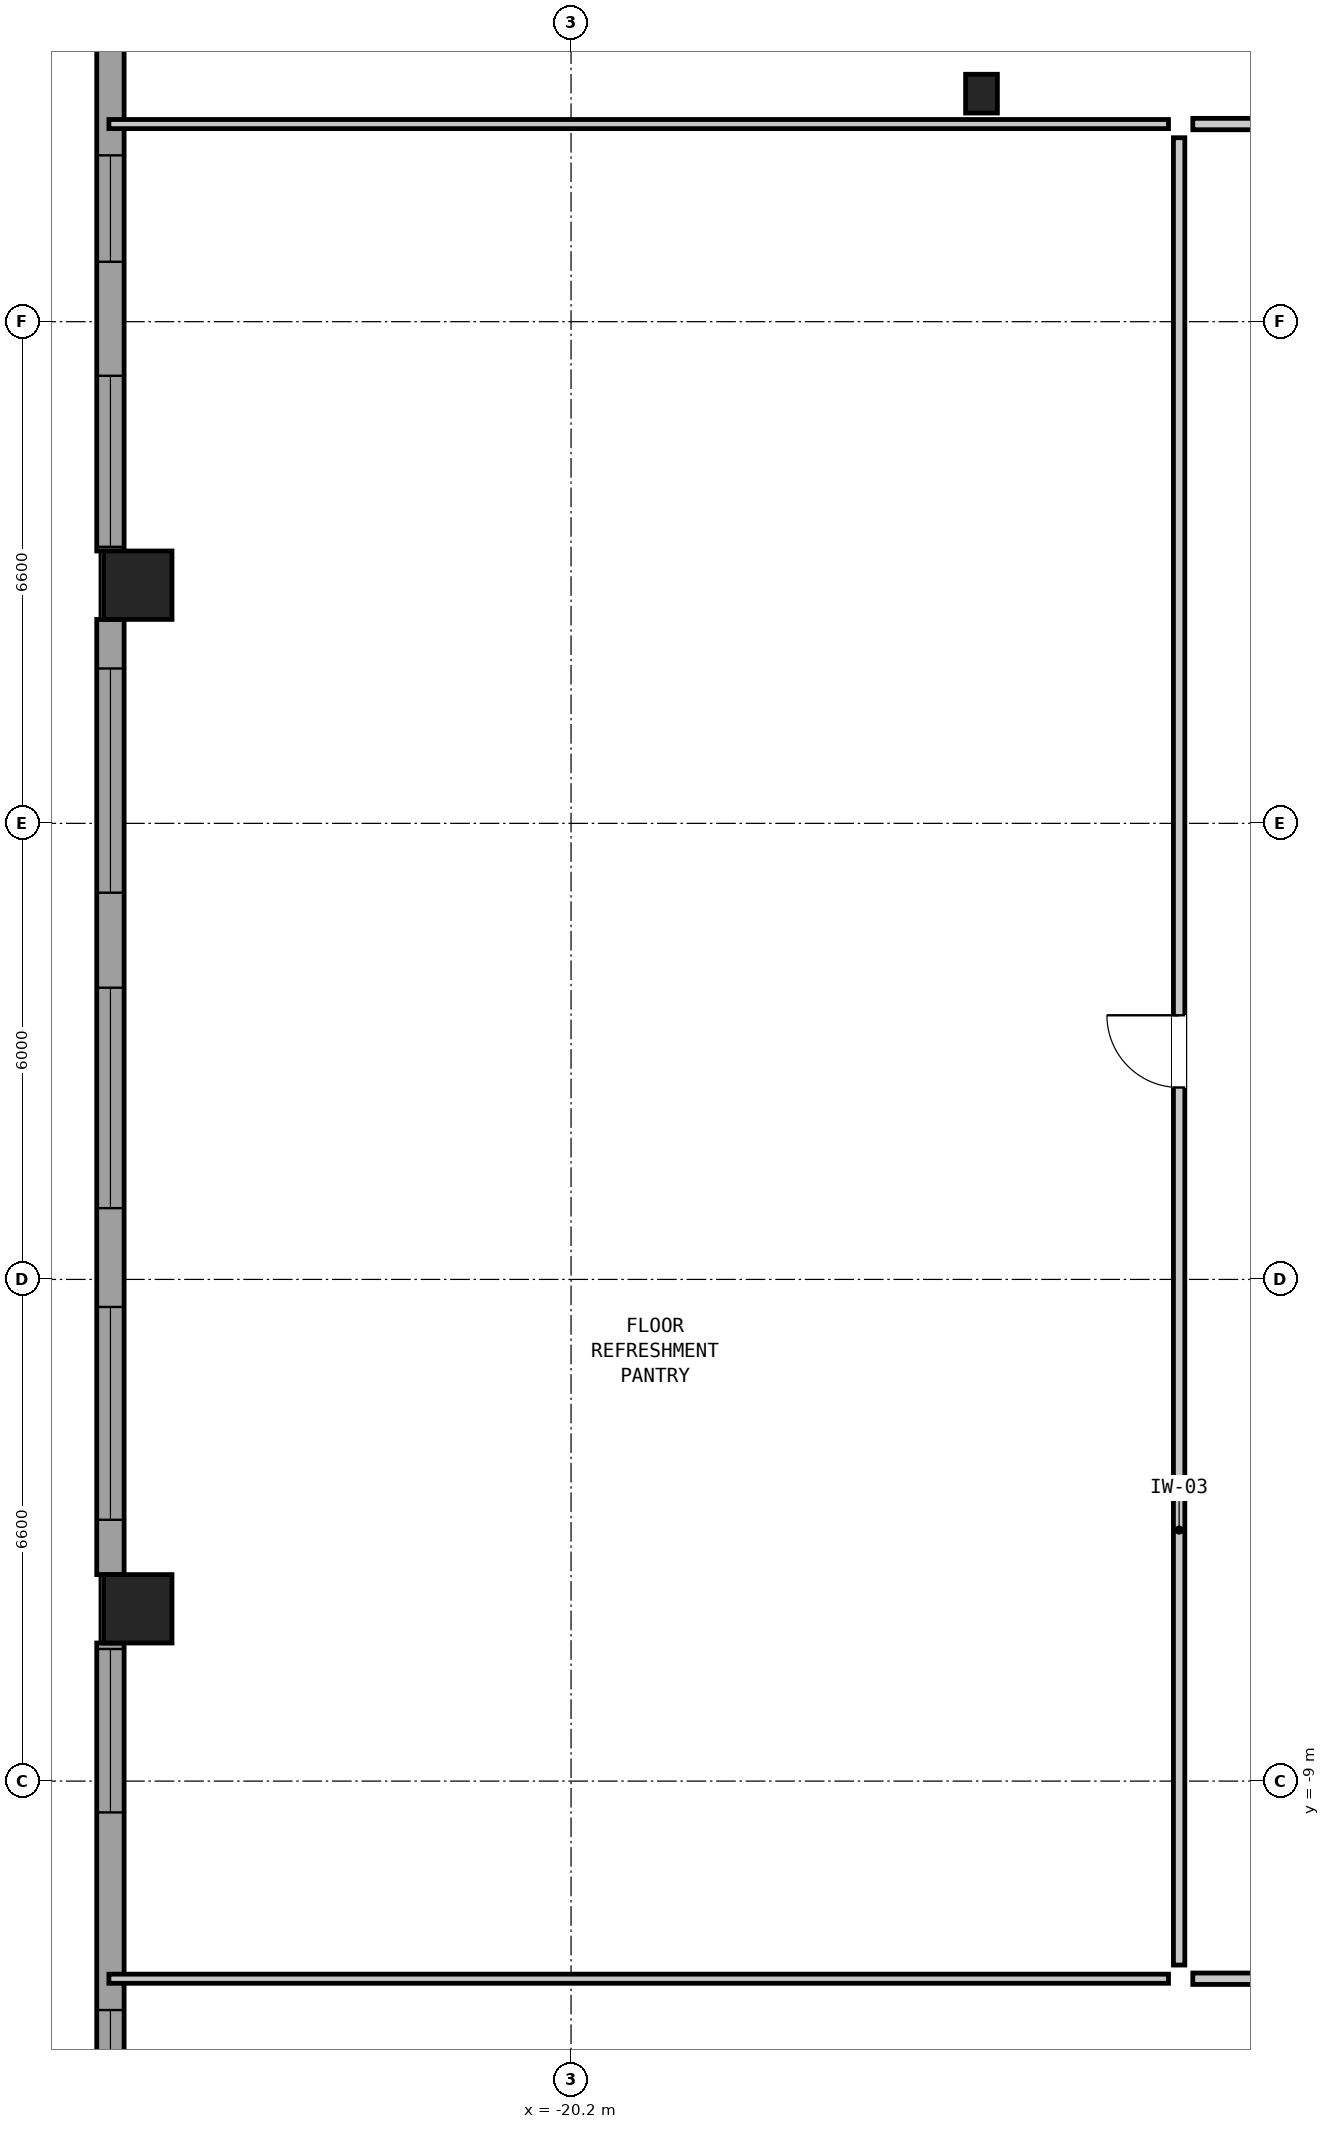
"""IFC4 building model, lengths in metres.
Left out: names, types, materials, properties, quantities, classifications, styles, units other than length and angle.
Written with IfcOpenShell. Run it as: python <this file> out.ifc"""

import sys

from ifc_helpers import new_model, si_unit, direction, frame, frame_2d, origin, origin_2d, place, context, subcontext, project, spatial, rectangle, hollow_rectangle, i_section, extrude, element, fill, save


model = new_model("IFC4")
c1 = context("Model", 3, precision=1e-05, world=origin(), true_north=direction((0.0, 1.0)))
c2 = subcontext(c1, "Body", "Model", "MODEL_VIEW")
j1 = project(units=[si_unit("LENGTHUNIT", "METRE"), si_unit("PLANEANGLEUNIT", "RADIAN")], contexts=[c1])
p1 = place(None, origin())
s1 = spatial("IfcSite", under=j1, at=p1, CompositionType="ELEMENT")
p2 = place(p1, origin())
s2 = spatial("IfcBuilding", under=s1, at=p2, CompositionType="ELEMENT")
p3 = place(p2, frame((0.0, 0.0, 29.15)))
s3 = spatial("IfcBuildingStorey", under=s2, at=p3, CompositionType="ELEMENT", Elevation=29.15)
for number, where, z_axis, x_axis in (
    (1, (-25.9, 6.733, 0.0), (0.0, 0.0, 1.0), (0.0, 1.0, 0.0)),
    (2, (-25.9, -6.733, 0.0), (0.0, 0.0, 1.0), (0.0, 1.0, 0.0)),
):
    element("IfcColumn", number, at=place(p3, frame(where, z_axis=z_axis, x_axis=x_axis)), inside=s3, PredefinedType="COLUMN", context=c2, shape_type="SweptSolid", body=[
        extrude(hollow_rectangle(XDim=0.9, YDim=0.9, WallThickness=0.055, at=origin_2d()), origin(), (0.0, 0.0, 1.0), 3.05),
    ])
p4 = place(p3, frame((-14.8, 13.2, 0.0), z_axis=(0.0, 0.0, 1.0), x_axis=(1.0, 0.0, 0.0)))
e3 = element("IfcColumn", 3, at=p4, inside=s3, PredefinedType="COLUMN", context=c2, shape_type="SweptSolid", body=[
    extrude(i_section(OverallWidth=0.418, OverallDepth=0.51, WebThickness=0.042, FlangeThickness=0.068, at=origin_2d()), origin(), (0.0, 0.0, 1.0), 3.05),
])
p5 = place(p3, frame((-26.26, -19.762, 0.0), z_axis=(0.0, 0.0, 1.0), x_axis=(0.0, 1.0, 0.0)))
e4 = element("IfcWall", 4, at=p5, inside=s3, PredefinedType="SOLIDWALL", context=c2, shape_type="SweptSolid", body=[
    extrude(rectangle(XDim=12.579, YDim=0.36, at=frame_2d((6.289, 0.0))), origin(), (0.0, 0.0, 1.0), 2.067),
])
p6 = place(p5, frame((1.8, 0.0, 0.2)))
e5 = element("IfcOpeningElement", 5, at=p6, cuts=e4, PredefinedType="OPENING", context=c2, shape_type="SweptSolid", body=[
    extrude(rectangle(XDim=2.65, YDim=1.05, at=frame_2d((1.325, 0.525))), frame((0.0, 0.192, 0.0), z_axis=(0.0, -1.0, 0.0), x_axis=(1.0, 0.0, 0.0)), (0.0, 0.0, 1.0), 0.384),
])
p7 = place(p5, frame((6.1, 0.0, 0.75)))
e6 = element("IfcOpeningElement", 6, at=p7, cuts=e4, PredefinedType="OPENING", context=c2, shape_type="SweptSolid", body=[
    extrude(rectangle(XDim=1.65, YDim=1.15, at=frame_2d((0.825, 0.575))), frame((0.0, 0.192, 0.0), z_axis=(0.0, -1.0, 0.0), x_axis=(1.0, 0.0, 0.0)), (0.0, 0.0, 1.0), 0.384),
])
p8 = place(p5, frame((10.35, 0.0, 0.2)))
e7 = element("IfcOpeningElement", 7, at=p8, cuts=e4, PredefinedType="OPENING", context=c2, shape_type="SweptSolid", body=[
    extrude(rectangle(XDim=2.15, YDim=1.2, at=frame_2d((1.075, 0.6))), frame((0.0, 0.192, 0.0), z_axis=(0.0, -1.0, 0.0), x_axis=(1.0, 0.0, 0.0)), (0.0, 0.0, 1.0), 0.384),
])
p9 = place(p3, frame((-26.26, -6.283, 0.0), z_axis=(0.0, 0.0, 1.0), x_axis=(0.0, 1.0, 0.0)))
e8 = element("IfcWall", 8, at=p9, inside=s3, PredefinedType="SOLIDWALL", context=c2, shape_type="SweptSolid", body=[
    extrude(rectangle(XDim=12.566, YDim=0.36, at=frame_2d((6.283, 0.0))), origin(), (0.0, 0.0, 1.0), 2.067),
])
p10 = place(p9, frame((0.721, 0.0, 0.9)))
e9 = element("IfcOpeningElement", 9, at=p10, cuts=e8, PredefinedType="OPENING", context=c2, shape_type="SweptSolid", body=[
    extrude(rectangle(XDim=2.8, YDim=1.0, at=frame_2d((1.4, 0.5))), frame((0.0, 0.192, 0.0), z_axis=(0.0, -1.0, 0.0), x_axis=(1.0, 0.0, 0.0)), (0.0, 0.0, 1.0), 0.384),
])
p11 = place(p9, frame((4.821, 0.0, 0.2)))
e10 = element("IfcOpeningElement", 10, at=p11, cuts=e8, PredefinedType="OPENING", context=c2, shape_type="SweptSolid", body=[
    extrude(rectangle(XDim=2.9, YDim=0.95, at=frame_2d((1.45, 0.475))), frame((0.0, 0.192, 0.0), z_axis=(0.0, -1.0, 0.0), x_axis=(1.0, 0.0, 0.0)), (0.0, 0.0, 1.0), 0.384),
])
p12 = place(p9, frame((8.971, 0.0, 0.95)))
e11 = element("IfcOpeningElement", 11, at=p12, cuts=e8, PredefinedType="OPENING", context=c2, shape_type="SweptSolid", body=[
    extrude(rectangle(XDim=2.95, YDim=0.95, at=frame_2d((1.475, 0.475))), frame((0.0, 0.192, 0.0), z_axis=(0.0, -1.0, 0.0), x_axis=(1.0, 0.0, 0.0)), (0.0, 0.0, 1.0), 0.384),
])
p13 = place(p3, frame((-26.26, 7.183, 0.0), z_axis=(0.0, 0.0, 1.0), x_axis=(0.0, 1.0, 0.0)))
e12 = element("IfcWall", 12, at=p13, inside=s3, PredefinedType="SOLIDWALL", context=c2, shape_type="SweptSolid", body=[
    extrude(rectangle(XDim=12.579, YDim=0.36, at=frame_2d((6.289, 0.0))), origin(), (0.0, 0.0, 1.0), 2.067),
])
p14 = place(p13, frame((0.055, 0.0, 0.2)))
e13 = element("IfcOpeningElement", 13, at=p14, cuts=e12, PredefinedType="OPENING", context=c2, shape_type="SweptSolid", body=[
    extrude(rectangle(XDim=2.25, YDim=1.15, at=frame_2d((1.125, 0.575))), frame((0.0, 0.192, 0.0), z_axis=(0.0, -1.0, 0.0), x_axis=(1.0, 0.0, 0.0)), (0.0, 0.0, 1.0), 0.384),
])
p15 = place(p13, frame((3.805, 0.0, 0.95)))
e14 = element("IfcOpeningElement", 14, at=p15, cuts=e12, PredefinedType="OPENING", context=c2, shape_type="SweptSolid", body=[
    extrude(rectangle(XDim=1.4, YDim=0.95, at=frame_2d((0.7, 0.475))), frame((0.0, 0.192, 0.0), z_axis=(0.0, -1.0, 0.0), x_axis=(1.0, 0.0, 0.0)), (0.0, 0.0, 1.0), 0.384),
])
p16 = place(p13, frame((8.055, 0.0, 0.2)))
e15 = element("IfcOpeningElement", 15, at=p16, cuts=e12, PredefinedType="OPENING", context=c2, shape_type="SweptSolid", body=[
    extrude(rectangle(XDim=2.8, YDim=1.0, at=frame_2d((1.4, 0.5))), frame((0.0, 0.192, 0.0), z_axis=(0.0, -1.0, 0.0), x_axis=(1.0, 0.0, 0.0)), (0.0, 0.0, 1.0), 0.384),
])
p17 = place(p3, frame((-26.28, 12.8, 0.0), z_axis=(0.0, 0.0, 1.0), x_axis=(1.0, 0.0, 0.0)))
e16 = element("IfcWall", 16, at=p17, inside=s3, PredefinedType="PARTITIONING", context=c2, shape_type="SweptSolid", body=[
    extrude(rectangle(XDim=13.94, YDim=0.12, at=frame_2d((6.97, 0.0))), origin(), (0.0, 0.0, 1.0), 2.83),
])
p18 = place(p3, frame((-26.28, -11.6, 0.0), z_axis=(0.0, 0.0, 1.0), x_axis=(1.0, 0.0, 0.0)))
e17 = element("IfcWall", 17, at=p18, inside=s3, PredefinedType="PARTITIONING", context=c2, shape_type="SweptSolid", body=[
    extrude(rectangle(XDim=13.94, YDim=0.12, at=frame_2d((6.97, 0.0))), origin(), (0.0, 0.0, 1.0), 2.274),
])
p19 = place(p3, frame((-12.02, 12.8, 0.0), z_axis=(0.0, 0.0, 1.0), x_axis=(1.0, 0.0, 0.0)))
e18 = element("IfcWall", 18, at=p19, inside=s3, PredefinedType="PARTITIONING", context=c2, shape_type="SweptSolid", body=[
    extrude(rectangle(XDim=8.34, YDim=0.15, at=frame_2d((4.17, 0.0))), origin(), (0.0, 0.0, 1.0), 2.83),
])
p20 = place(p19, frame((3.695, 0.0, 0.0)))
e19 = element("IfcOpeningElement", 19, at=p20, cuts=e18, PredefinedType="OPENING", context=c2, shape_type="SweptSolid", body=[
    extrude(rectangle(XDim=0.95, YDim=2.1, at=frame_2d((0.475, 1.05))), frame((0.0, 0.087, 0.0), z_axis=(0.0, -1.0, 0.0), x_axis=(1.0, 0.0, 0.0)), (0.0, 0.0, 1.0), 0.174),
])
p21 = place(p3, frame((-12.02, -11.6, 0.0), z_axis=(0.0, 0.0, 1.0), x_axis=(1.0, 0.0, 0.0)))
e20 = element("IfcWall", 20, at=p21, inside=s3, PredefinedType="PARTITIONING", context=c2, shape_type="SweptSolid", body=[
    extrude(rectangle(XDim=24.04, YDim=0.15, at=frame_2d((12.02, 0.0))), origin(), (0.0, 0.0, 1.0), 2.274),
])
p22 = place(p21, frame((11.545, 0.0, 0.0)))
e21 = element("IfcOpeningElement", 21, at=p22, cuts=e20, PredefinedType="OPENING", context=c2, shape_type="SweptSolid", body=[
    extrude(rectangle(XDim=0.95, YDim=2.1, at=frame_2d((0.475, 1.05))), frame((0.0, 0.087, 0.0), z_axis=(0.0, -1.0, 0.0), x_axis=(1.0, 0.0, 0.0)), (0.0, 0.0, 1.0), 0.174),
])
p23 = place(p3, frame((-12.2, -11.42, 0.0), z_axis=(0.0, 0.0, 1.0), x_axis=(0.0, 1.0, 0.0)))
e22 = element("IfcWall", 22, at=p23, inside=s3, PredefinedType="PARTITIONING", context=c2, shape_type="SweptSolid", body=[
    extrude(rectangle(XDim=24.04, YDim=0.15, at=frame_2d((12.02, 0.0))), origin(), (0.0, 0.0, 1.0), 2.83),
])
p24 = place(p23, frame((11.545, 0.0, 0.0)))
e23 = element("IfcOpeningElement", 23, at=p24, cuts=e22, PredefinedType="OPENING", context=c2, shape_type="SweptSolid", body=[
    extrude(rectangle(XDim=0.95, YDim=2.1, at=frame_2d((0.475, 1.05))), frame((0.0, 0.087, 0.0), z_axis=(0.0, -1.0, 0.0), x_axis=(1.0, 0.0, 0.0)), (0.0, 0.0, 1.0), 0.174),
])
p25 = place(p7, origin())
e24 = element("IfcWindow", 24, at=p25, inside=s3, PartitioningType="SINGLE_PANEL", PredefinedType="WINDOW", context=c2, shape_type="SweptSolid", body=[
    extrude(rectangle(XDim=1.65, YDim=1.15, at=frame_2d((0.825, 0.575))), frame((0.0, 0.03, 0.0), z_axis=(0.0, -1.0, 0.0), x_axis=(1.0, 0.0, 0.0)), (0.0, 0.0, 1.0), 0.06),
])
fill(e6, e24)
p26 = place(p8, origin())
e25 = element("IfcWindow", 25, at=p26, inside=s3, PartitioningType="SINGLE_PANEL", PredefinedType="WINDOW", context=c2, shape_type="SweptSolid", body=[
    extrude(rectangle(XDim=2.15, YDim=1.2, at=frame_2d((1.075, 0.6))), frame((0.0, 0.03, 0.0), z_axis=(0.0, -1.0, 0.0), x_axis=(1.0, 0.0, 0.0)), (0.0, 0.0, 1.0), 0.06),
])
fill(e7, e25)
p27 = place(p10, origin())
e26 = element("IfcWindow", 26, at=p27, inside=s3, PartitioningType="SINGLE_PANEL", PredefinedType="WINDOW", context=c2, shape_type="SweptSolid", body=[
    extrude(rectangle(XDim=2.8, YDim=1.0, at=frame_2d((1.4, 0.5))), frame((0.0, 0.03, 0.0), z_axis=(0.0, -1.0, 0.0), x_axis=(1.0, 0.0, 0.0)), (0.0, 0.0, 1.0), 0.06),
])
fill(e9, e26)
p28 = place(p11, origin())
e27 = element("IfcWindow", 27, at=p28, inside=s3, PartitioningType="SINGLE_PANEL", PredefinedType="WINDOW", context=c2, shape_type="SweptSolid", body=[
    extrude(rectangle(XDim=2.9, YDim=0.95, at=frame_2d((1.45, 0.475))), frame((0.0, 0.03, 0.0), z_axis=(0.0, -1.0, 0.0), x_axis=(1.0, 0.0, 0.0)), (0.0, 0.0, 1.0), 0.06),
])
fill(e10, e27)
p29 = place(p12, origin())
e28 = element("IfcWindow", 28, at=p29, inside=s3, PartitioningType="SINGLE_PANEL", PredefinedType="WINDOW", context=c2, shape_type="SweptSolid", body=[
    extrude(rectangle(XDim=2.95, YDim=0.95, at=frame_2d((1.475, 0.475))), frame((0.0, 0.03, 0.0), z_axis=(0.0, -1.0, 0.0), x_axis=(1.0, 0.0, 0.0)), (0.0, 0.0, 1.0), 0.06),
])
fill(e11, e28)
p30 = place(p14, origin())
e29 = element("IfcWindow", 29, at=p30, inside=s3, PartitioningType="SINGLE_PANEL", PredefinedType="WINDOW", context=c2, shape_type="SweptSolid", body=[
    extrude(rectangle(XDim=2.25, YDim=1.15, at=frame_2d((1.125, 0.575))), frame((0.0, 0.03, 0.0), z_axis=(0.0, -1.0, 0.0), x_axis=(1.0, 0.0, 0.0)), (0.0, 0.0, 1.0), 0.06),
])
fill(e13, e29)
p31 = place(p15, origin())
e30 = element("IfcWindow", 30, at=p31, inside=s3, PartitioningType="SINGLE_PANEL", PredefinedType="WINDOW", context=c2, shape_type="SweptSolid", body=[
    extrude(rectangle(XDim=1.4, YDim=0.95, at=frame_2d((0.7, 0.475))), frame((0.0, 0.03, 0.0), z_axis=(0.0, -1.0, 0.0), x_axis=(1.0, 0.0, 0.0)), (0.0, 0.0, 1.0), 0.06),
])
fill(e14, e30)
p32 = place(p24, origin())
e31 = element("IfcDoor", 31, at=p32, inside=s3, OperationType="SINGLE_SWING_RIGHT", PredefinedType="DOOR", context=c2, shape_type="SweptSolid", body=[
    extrude(rectangle(XDim=0.95, YDim=2.1, at=frame_2d((0.475, 1.05))), frame((0.0, 0.025, 0.0), z_axis=(0.0, -1.0, 0.0), x_axis=(1.0, 0.0, 0.0)), (0.0, 0.0, 1.0), 0.05),
])
fill(e23, e31)
save(model, sys.argv[1])
